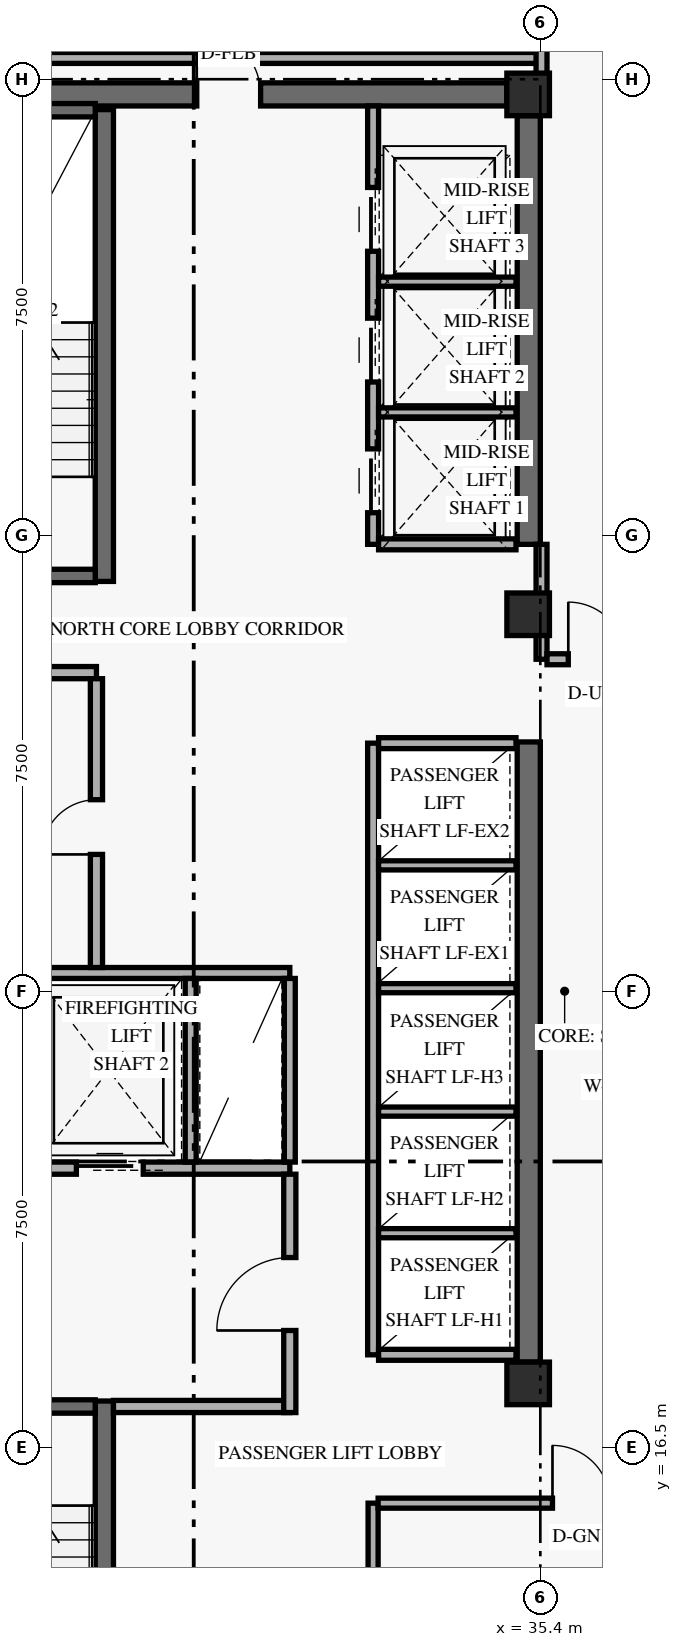
"""IFC4 building model, lengths in metres.
Left out: names, types, materials, properties, quantities, classifications, styles, units other than length and angle.
Written with IfcOpenShell. Run it as: python <this file> out.ifc"""

import sys

from ifc_helpers import new_model, si_unit, direction, frame, frame_2d, origin, origin_2d, place, context, subcontext, project, spatial, rectangle, extrude, element, fill, save


model = new_model("IFC4")
c1 = context("Model", 3, precision=1e-05, world=origin(), true_north=direction((0.0, 1.0)))
c2 = subcontext(c1, "Body", "Model", "MODEL_VIEW")
j1 = project(units=[si_unit("LENGTHUNIT", "METRE"), si_unit("PLANEANGLEUNIT", "RADIAN")], contexts=[c1])
p1 = place(None, origin())
s1 = spatial("IfcSite", under=j1, at=p1, CompositionType="ELEMENT")
p2 = place(p1, origin())
s2 = spatial("IfcBuilding", under=s1, at=p2, CompositionType="ELEMENT")
p3 = place(p2, frame((0.0, 0.0, 155.4)))
s3 = spatial("IfcBuildingStorey", under=s2, at=p3, CompositionType="ELEMENT", Elevation=155.4)
p4 = place(p3, frame((35.21, 17.9, 0.0), z_axis=(0.0, 0.0, 1.0), x_axis=(0.0, 1.0, 0.0)))
e1 = element("IfcWall", 1, at=p4, inside=s3, PredefinedType="SHEAR", context=c2, shape_type="SweptSolid", body=[
    extrude(rectangle(XDim=10.2, YDim=0.38, at=frame_2d((5.1, 0.0))), origin(), (0.0, 0.0, 1.0), 2.748),
])
p5 = place(p3, frame((35.21, 31.35, 0.0), z_axis=(0.0, 0.0, 1.0), x_axis=(0.0, 1.0, 0.0)))
e2 = element("IfcWall", 2, at=p5, inside=s3, PredefinedType="SHEAR", context=c2, shape_type="SweptSolid", body=[
    extrude(rectangle(XDim=7.05, YDim=0.38, at=frame_2d((3.525, 0.0))), origin(), (0.0, 0.0, 1.0), 2.748),
])
p6 = place(p3, frame((24.55, 38.75, 0.0), z_axis=(0.0, 0.0, 1.0), x_axis=(1.0, 0.0, 0.0)))
e3 = element("IfcWall", 3, at=p6, inside=s3, PredefinedType="SHEAR", context=c2, shape_type="SweptSolid", body=[
    extrude(rectangle(XDim=10.3, YDim=0.38, at=frame_2d((5.15, 0.0))), origin(), (0.0, 0.0, 1.0), 3.36),
])
p7 = place(p6, frame((5.2, 0.0, 0.0)))
e4 = element("IfcOpeningElement", 4, at=p7, cuts=e3, PredefinedType="OPENING", context=c2, shape_type="SweptSolid", body=[
    extrude(rectangle(XDim=1.05, YDim=2.15, at=frame_2d((0.525, 1.075))), frame((0.0, 0.2, 0.0), z_axis=(0.0, -1.0, 0.0), x_axis=(1.0, 0.0, 0.0)), (0.0, 0.0, 1.0), 0.4),
])
p8 = place(p3, frame((28.23, 9.5, 0.0), z_axis=(0.0, 0.0, 1.0), x_axis=(0.0, 1.0, 0.0)))
e5 = element("IfcWall", 5, at=p8, inside=s3, PredefinedType="SHEAR", context=c2, shape_type="SweptSolid", body=[
    extrude(rectangle(XDim=7.76, YDim=0.3, at=frame_2d((3.88, 0.0))), origin(), (0.0, 0.0, 1.0), 3.36),
])
p9 = place(p3, frame((24.92, 17.17, 0.0), z_axis=(0.0, 0.0, 1.0), x_axis=(1.0, 0.0, 0.0)))
e6 = element("IfcWall", 6, at=p9, inside=s3, PredefinedType="SHEAR", context=c2, shape_type="SweptSolid", body=[
    extrude(rectangle(XDim=3.16, YDim=0.22, at=frame_2d((1.58, 0.0))), origin(), (0.0, 0.0, 1.0), 3.36),
])
p10 = place(p9, frame((0.78, 0.0, 0.0)))
e7 = element("IfcOpeningElement", 7, at=p10, cuts=e6, PredefinedType="OPENING", context=c2, shape_type="SweptSolid", body=[
    extrude(rectangle(XDim=1.05, YDim=2.15, at=frame_2d((0.525, 1.075))), frame((0.0, 0.12, 0.0), z_axis=(0.0, -1.0, 0.0), x_axis=(1.0, 0.0, 0.0)), (0.0, 0.0, 1.0), 0.24),
])
p11 = place(p3, frame((28.23, 30.74, 0.0), z_axis=(0.0, 0.0, 1.0), x_axis=(0.0, 1.0, 0.0)))
e8 = element("IfcWall", 8, at=p11, inside=s3, PredefinedType="SHEAR", context=c2, shape_type="SweptSolid", body=[
    extrude(rectangle(XDim=7.76, YDim=0.3, at=frame_2d((3.88, 0.0))), origin(), (0.0, 0.0, 1.0), 3.36),
])
p12 = place(p3, frame((24.92, 30.83, 0.0), z_axis=(0.0, 0.0, 1.0), x_axis=(1.0, 0.0, 0.0)))
e9 = element("IfcWall", 9, at=p12, inside=s3, PredefinedType="SHEAR", context=c2, shape_type="SweptSolid", body=[
    extrude(rectangle(XDim=3.16, YDim=0.22, at=frame_2d((1.58, 0.0))), origin(), (0.0, 0.0, 1.0), 3.36),
])
p13 = place(p12, frame((0.78, 0.0, 0.0)))
e10 = element("IfcOpeningElement", 10, at=p13, cuts=e9, PredefinedType="OPENING", context=c2, shape_type="SweptSolid", body=[
    extrude(rectangle(XDim=1.05, YDim=2.15, at=frame_2d((0.525, 1.075))), frame((0.0, 0.12, 0.0), z_axis=(0.0, -1.0, 0.0), x_axis=(1.0, 0.0, 0.0)), (0.0, 0.0, 1.0), 0.24),
])
p14 = place(p3, frame((24.92, 38.49, 0.0), z_axis=(0.0, 0.0, 1.0), x_axis=(1.0, 0.0, 0.0)))
e11 = element("IfcWall", 11, at=p14, inside=s3, PredefinedType="SHEAR", context=c2, shape_type="SweptSolid", body=[
    extrude(rectangle(XDim=3.16, YDim=0.22, at=frame_2d((1.58, 0.0))), origin(), (0.0, 0.0, 1.0), 3.36),
])
for number, where, z_axis, x_axis in (
    (12, (35.2, 17.55, 0.0), (0.0, 0.0, 1.0), (1.0, 0.0, 0.0)),
    (13, (35.2, 30.2, 0.0), (0.0, 0.0, 1.0), (1.0, 0.0, 0.0)),
    (14, (35.2, 38.75, 0.0), (0.0, 0.0, 1.0), (1.0, 0.0, 0.0)),
):
    element("IfcColumn", number, at=place(p3, frame(where, z_axis=z_axis, x_axis=x_axis)), inside=s3, PredefinedType="COLUMN", context=c2, shape_type="SweptSolid", body=[
        extrude(rectangle(XDim=0.7, YDim=0.7, at=origin_2d()), origin(), (0.0, 0.0, 1.0), 3.6),
    ])
p15 = place(p3, frame((24.45, 21.09, 0.0), z_axis=(0.0, 0.0, 1.0), x_axis=(1.0, 0.0, 0.0)))
e15 = element("IfcWall", 15, at=p15, inside=s3, PredefinedType="STANDARD", context=c2, shape_type="SweptSolid", body=[
    extrude(rectangle(XDim=6.83, YDim=0.2, at=frame_2d((3.415, 0.0))), origin(), (0.0, 0.0, 1.0), 3.36),
])
p16 = place(p15, frame((0.72, 0.0, 0.0)))
e16 = element("IfcOpeningElement", 16, at=p16, cuts=e15, PredefinedType="OPENING", context=c2, shape_type="SweptSolid", body=[
    extrude(rectangle(XDim=1.1, YDim=2.2, at=frame_2d((0.55, 1.1))), frame((0.0, 0.11, 0.0), z_axis=(0.0, -1.0, 0.0), x_axis=(1.0, 0.0, 0.0)), (0.0, 0.0, 1.0), 0.22),
])
p17 = place(p15, frame((3.32, 0.0, 0.0)))
e17 = element("IfcOpeningElement", 17, at=p17, cuts=e15, PredefinedType="OPENING", context=c2, shape_type="SweptSolid", body=[
    extrude(rectangle(XDim=1.1, YDim=2.2, at=frame_2d((0.55, 1.1))), frame((0.0, 0.11, 0.0), z_axis=(0.0, -1.0, 0.0), x_axis=(1.0, 0.0, 0.0)), (0.0, 0.0, 1.0), 0.22),
])
p18 = place(p3, frame((28.38, 17.17, 0.0), z_axis=(0.0, 0.0, 1.0), x_axis=(1.0, 0.0, 0.0)))
e18 = element("IfcWall", 18, at=p18, inside=s3, PredefinedType="STANDARD", context=c2, shape_type="SweptSolid", body=[
    extrude(rectangle(XDim=2.9, YDim=0.2, at=frame_2d((1.45, 0.0))), origin(), (0.0, 0.0, 1.0), 3.36),
])
p19 = place(p3, frame((31.28, 17.07, 0.0), z_axis=(0.0, 0.0, 1.0), x_axis=(0.0, 1.0, 0.0)))
e19 = element("IfcWall", 19, at=p19, inside=s3, PredefinedType="STANDARD", context=c2, shape_type="SweptSolid", body=[
    extrude(rectangle(XDim=3.92, YDim=0.2, at=frame_2d((1.96, 0.0))), origin(), (0.0, 0.0, 1.0), 2.73),
])
p20 = place(p19, frame((1.35, 0.0, 0.0)))
e20 = element("IfcOpeningElement", 20, at=p20, cuts=e19, PredefinedType="OPENING", context=c2, shape_type="SweptSolid", body=[
    extrude(rectangle(XDim=1.2, YDim=2.15, at=frame_2d((0.6, 1.075))), frame((0.0, 0.11, 0.0), z_axis=(0.0, -1.0, 0.0), x_axis=(1.0, 0.0, 0.0)), (0.0, 0.0, 1.0), 0.22),
])
p21 = place(p3, frame((24.45, 24.3, 0.0), z_axis=(0.0, 0.0, 1.0), x_axis=(1.0, 0.0, 0.0)))
e21 = element("IfcWall", 21, at=p21, inside=s3, PredefinedType="STANDARD", context=c2, shape_type="SweptSolid", body=[
    extrude(rectangle(XDim=6.83, YDim=0.18, at=frame_2d((3.415, 0.0))), origin(), (0.0, 0.0, 1.0), 3.36),
])
for number, where, z_axis, x_axis in (
    (22, (29.65, 21.19, 0.0), (0.0, 0.0, 1.0), (0.0, 1.0, 0.0)),
    (23, (31.28, 21.19, 0.0), (0.0, 0.0, 1.0), (0.0, 1.0, 0.0)),
):
    element("IfcWall", number, at=place(p3, frame(where, z_axis=z_axis, x_axis=x_axis)), inside=s3, PredefinedType="STANDARD", context=c2, shape_type="SweptSolid", body=[
        extrude(rectangle(XDim=3.02, YDim=0.18, at=frame_2d((1.51, 0.0))), origin(), (0.0, 0.0, 1.0), 3.36),
    ])
p22 = place(p3, frame((24.45, 29.24, 0.0), z_axis=(0.0, 0.0, 1.0), x_axis=(1.0, 0.0, 0.0)))
e24 = element("IfcWall", 24, at=p22, inside=s3, PredefinedType="STANDARD", context=c2, shape_type="SweptSolid", body=[
    extrude(rectangle(XDim=3.65, YDim=0.2, at=frame_2d((1.825, 0.0))), origin(), (0.0, 0.0, 1.0), 3.36),
])
p23 = place(p3, frame((28.1, 24.39, 0.0), z_axis=(0.0, 0.0, 1.0), x_axis=(0.0, 1.0, 0.0)))
e25 = element("IfcWall", 25, at=p23, inside=s3, PredefinedType="STANDARD", context=c2, shape_type="SweptSolid", body=[
    extrude(rectangle(XDim=4.75, YDim=0.2, at=frame_2d((2.375, 0.0))), origin(), (0.0, 0.0, 1.0), 3.36),
])
p24 = place(p23, frame((1.86, 0.0, 0.0)))
e26 = element("IfcOpeningElement", 26, at=p24, cuts=e25, PredefinedType="OPENING", context=c2, shape_type="SweptSolid", body=[
    extrude(rectangle(XDim=0.9, YDim=2.1, at=frame_2d((0.45, 1.05))), frame((0.0, 0.11, 0.0), z_axis=(0.0, -1.0, 0.0), x_axis=(1.0, 0.0, 0.0)), (0.0, 0.0, 1.0), 0.22),
])
p25 = place(p3, frame((32.65, 18.02, 0.0), z_axis=(0.0, 0.0, 1.0), x_axis=(0.0, 1.0, 0.0)))
e27 = element("IfcWall", 27, at=p25, inside=s3, PredefinedType="STANDARD", context=c2, shape_type="SweptSolid", body=[
    extrude(rectangle(XDim=10.06, YDim=0.18, at=frame_2d((5.03, 0.0))), origin(), (0.0, 0.0, 1.0), 3.36),
])
for number, where, z_axis, x_axis in (
    (28, (32.74, 18.02, 0.0), (0.0, 0.0, 1.0), (1.0, 0.0, 0.0)),
    (29, (32.74, 28.08, 0.0), (0.0, 0.0, 1.0), (1.0, 0.0, 0.0)),
):
    element("IfcWall", number, at=place(p3, frame(where, z_axis=z_axis, x_axis=x_axis)), inside=s3, PredefinedType="STANDARD", context=c2, shape_type="SweptSolid", body=[
        extrude(rectangle(XDim=2.26, YDim=0.18, at=frame_2d((1.13, 0.0))), origin(), (0.0, 0.0, 1.0), 3.36),
    ])
for number, where, z_axis, x_axis in (
    (30, (32.74, 20.02, 0.0), (0.0, 0.0, 1.0), (1.0, 0.0, 0.0)),
    (31, (32.74, 22.02, 0.0), (0.0, 0.0, 1.0), (1.0, 0.0, 0.0)),
    (32, (32.74, 24.05, 0.0), (0.0, 0.0, 1.0), (1.0, 0.0, 0.0)),
    (33, (32.74, 26.07, 0.0), (0.0, 0.0, 1.0), (1.0, 0.0, 0.0)),
):
    element("IfcWall", number, at=place(p3, frame(where, z_axis=z_axis, x_axis=x_axis)), inside=s3, PredefinedType="STANDARD", context=c2, shape_type="SweptSolid", body=[
        extrude(rectangle(XDim=2.26, YDim=0.15, at=frame_2d((1.13, 0.0))), origin(), (0.0, 0.0, 1.0), 3.36),
    ])
p26 = place(p3, frame((32.65, 31.35, 0.0), z_axis=(0.0, 0.0, 1.0), x_axis=(0.0, 1.0, 0.0)))
e34 = element("IfcWall", 34, at=p26, inside=s3, PredefinedType="STANDARD", context=c2, shape_type="SweptSolid", body=[
    extrude(rectangle(XDim=7.21, YDim=0.18, at=frame_2d((3.605, 0.0))), origin(), (0.0, 0.0, 1.0), 3.36),
])
p27 = place(p26, frame((0.52, 0.0, 0.0)))
e35 = element("IfcOpeningElement", 35, at=p27, cuts=e34, PredefinedType="OPENING", context=c2, shape_type="SweptSolid", body=[
    extrude(rectangle(XDim=1.05, YDim=2.2, at=frame_2d((0.525, 1.1))), frame((0.0, 0.1, 0.0), z_axis=(0.0, -1.0, 0.0), x_axis=(1.0, 0.0, 0.0)), (0.0, 0.0, 1.0), 0.2),
])
p28 = place(p26, frame((2.67, 0.0, 0.0)))
e36 = element("IfcOpeningElement", 36, at=p28, cuts=e34, PredefinedType="OPENING", context=c2, shape_type="SweptSolid", body=[
    extrude(rectangle(XDim=1.05, YDim=2.2, at=frame_2d((0.525, 1.1))), frame((0.0, 0.1, 0.0), z_axis=(0.0, -1.0, 0.0), x_axis=(1.0, 0.0, 0.0)), (0.0, 0.0, 1.0), 0.2),
])
p29 = place(p26, frame((4.82, 0.0, 0.0)))
e37 = element("IfcOpeningElement", 37, at=p29, cuts=e34, PredefinedType="OPENING", context=c2, shape_type="SweptSolid", body=[
    extrude(rectangle(XDim=1.05, YDim=2.2, at=frame_2d((0.525, 1.1))), frame((0.0, 0.1, 0.0), z_axis=(0.0, -1.0, 0.0), x_axis=(1.0, 0.0, 0.0)), (0.0, 0.0, 1.0), 0.2),
])
p30 = place(p3, frame((32.74, 31.35, 0.0), z_axis=(0.0, 0.0, 1.0), x_axis=(1.0, 0.0, 0.0)))
e38 = element("IfcWall", 38, at=p30, inside=s3, PredefinedType="STANDARD", context=c2, shape_type="SweptSolid", body=[
    extrude(rectangle(XDim=2.26, YDim=0.18, at=frame_2d((1.13, 0.0))), origin(), (0.0, 0.0, 1.0), 3.36),
])
for number, where, z_axis, x_axis in (
    (39, (32.74, 33.52, 0.0), (0.0, 0.0, 1.0), (1.0, 0.0, 0.0)),
    (40, (32.74, 35.67, 0.0), (0.0, 0.0, 1.0), (1.0, 0.0, 0.0)),
):
    element("IfcWall", number, at=place(p3, frame(where, z_axis=z_axis, x_axis=x_axis)), inside=s3, PredefinedType="STANDARD", context=c2, shape_type="SweptSolid", body=[
        extrude(rectangle(XDim=2.26, YDim=0.15, at=frame_2d((1.13, 0.0))), origin(), (0.0, 0.0, 1.0), 3.36),
    ])
p31 = place(p3, frame((32.65, 9.5, 0.0), z_axis=(0.0, 0.0, 1.0), x_axis=(0.0, 1.0, 0.0)))
e41 = element("IfcWall", 41, at=p31, inside=s3, PredefinedType="PARTITIONING", context=c2, shape_type="SweptSolid", body=[
    extrude(rectangle(XDim=6.08, YDim=0.165, at=frame_2d((3.04, 0.0))), origin(), (0.0, 0.0, 1.0), 3.36),
])
p32 = place(p3, frame((32.732, 15.58, 0.0), z_axis=(0.0, 0.0, 1.0), x_axis=(1.0, 0.0, 0.0)))
e42 = element("IfcWall", 42, at=p32, inside=s3, PredefinedType="PARTITIONING", context=c2, shape_type="SweptSolid", body=[
    extrude(rectangle(XDim=4.818, YDim=0.165, at=frame_2d((2.409, 0.0))), origin(), (0.0, 0.0, 1.0), 2.73),
])
p33 = place(p32, frame((2.867, 0.0, 0.0)))
e43 = element("IfcOpeningElement", 43, at=p33, cuts=e42, PredefinedType="OPENING", context=c2, shape_type="SweptSolid", body=[
    extrude(rectangle(XDim=0.95, YDim=2.15, at=frame_2d((0.475, 1.075))), frame((0.0, 0.093, 0.0), z_axis=(0.0, -1.0, 0.0), x_axis=(1.0, 0.0, 0.0)), (0.0, 0.0, 1.0), 0.185),
])
p34 = place(p3, frame((35.42, 29.46, 0.0), z_axis=(0.0, 0.0, 1.0), x_axis=(0.0, 1.0, 0.0)))
e44 = element("IfcWall", 44, at=p34, inside=s3, PredefinedType="STANDARD", context=c2, shape_type="SweptSolid", body=[
    extrude(rectangle(XDim=1.89, YDim=0.18, at=frame_2d((0.945, 0.0))), origin(), (0.0, 0.0, 1.0), 2.73),
])
p35 = place(p3, frame((35.51, 29.46, 0.0), z_axis=(0.0, 0.0, 1.0), x_axis=(1.0, 0.0, 0.0)))
e45 = element("IfcWall", 45, at=p35, inside=s3, PredefinedType="STANDARD", context=c2, shape_type="SweptSolid", body=[
    extrude(rectangle(XDim=14.29, YDim=0.18, at=frame_2d((7.145, 0.0))), origin(), (0.0, 0.0, 1.0), 2.73),
])
p36 = place(p35, frame((0.35, 0.0, 0.0)))
e46 = element("IfcOpeningElement", 46, at=p36, cuts=e45, PredefinedType="OPENING", context=c2, shape_type="SweptSolid", body=[
    extrude(rectangle(XDim=0.94, YDim=2.15, at=frame_2d((0.47, 1.075))), frame((0.0, 0.1, 0.0), z_axis=(0.0, -1.0, 0.0), x_axis=(1.0, 0.0, 0.0)), (0.0, 0.0, 1.0), 0.2),
])
p37 = place(p35, frame((7.828, 0.0, 0.0)))
e47 = element("IfcOpeningElement", 47, at=p37, cuts=e45, PredefinedType="OPENING", context=c2, shape_type="SweptSolid", body=[
    extrude(rectangle(XDim=0.94, YDim=2.15, at=frame_2d((0.47, 1.075))), frame((0.0, 0.1, 0.0), z_axis=(0.0, -1.0, 0.0), x_axis=(1.0, 0.0, 0.0)), (0.0, 0.0, 1.0), 0.2),
])
p38 = place(p3, frame((23.85, 39.35, 0.0), z_axis=(0.0, 0.0, 1.0), x_axis=(1.0, 0.0, 0.0)))
e48 = element("IfcWall", 48, at=p38, inside=s3, PredefinedType="STANDARD", context=c2, shape_type="SweptSolid", body=[
    extrude(rectangle(XDim=11.57, YDim=0.18, at=frame_2d((5.785, 0.0))), origin(), (0.0, 0.0, 1.0), 2.73),
])
p39 = place(p3, frame((35.42, 38.75, 0.0), z_axis=(0.0, 0.0, 1.0), x_axis=(0.0, 1.0, 0.0)))
e49 = element("IfcWall", 49, at=p39, inside=s3, PredefinedType="PARTITIONING", context=c2, shape_type="SweptSolid", body=[
    extrude(rectangle(XDim=4.97, YDim=0.18, at=frame_2d((2.485, 0.0))), origin(), (0.0, 0.0, 1.0), 2.73),
])
p40 = place(p17, origin())
e50 = element("IfcDoor", 50, at=p40, inside=s3, OperationType="SLIDING_TO_LEFT", PredefinedType="DOOR", context=c2, shape_type="SweptSolid", body=[
    extrude(rectangle(XDim=1.1, YDim=2.2, at=frame_2d((0.55, 1.1))), frame((0.0, 0.025, 0.0), z_axis=(0.0, -1.0, 0.0), x_axis=(1.0, 0.0, 0.0)), (0.0, 0.0, 1.0), 0.05),
])
fill(e17, e50)
p41 = place(p20, origin())
e51 = element("IfcDoor", 51, at=p41, inside=s3, OperationType="SINGLE_SWING_LEFT", PredefinedType="DOOR", context=c2, shape_type="SweptSolid", body=[
    extrude(rectangle(XDim=1.2, YDim=2.15, at=frame_2d((0.6, 1.075))), frame((0.0, 0.025, 0.0), z_axis=(0.0, -1.0, 0.0), x_axis=(1.0, 0.0, 0.0)), (0.0, 0.0, 1.0), 0.05),
])
fill(e20, e51)
p42 = place(p24, origin())
e52 = element("IfcDoor", 52, at=p42, inside=s3, OperationType="SINGLE_SWING_LEFT", PredefinedType="DOOR", context=c2, shape_type="SweptSolid", body=[
    extrude(rectangle(XDim=0.9, YDim=2.1, at=frame_2d((0.45, 1.05))), frame((0.0, 0.025, 0.0), z_axis=(0.0, -1.0, 0.0), x_axis=(1.0, 0.0, 0.0)), (0.0, 0.0, 1.0), 0.05),
])
fill(e26, e52)
p43 = place(p27, origin())
e53 = element("IfcDoor", 53, at=p43, inside=s3, OperationType="SLIDING_TO_LEFT", PredefinedType="DOOR", context=c2, shape_type="SweptSolid", body=[
    extrude(rectangle(XDim=1.05, YDim=2.2, at=frame_2d((0.525, 1.1))), frame((0.0, 0.025, 0.0), z_axis=(0.0, -1.0, 0.0), x_axis=(1.0, 0.0, 0.0)), (0.0, 0.0, 1.0), 0.05),
])
fill(e35, e53)
p44 = place(p28, origin())
e54 = element("IfcDoor", 54, at=p44, inside=s3, OperationType="SLIDING_TO_LEFT", PredefinedType="DOOR", context=c2, shape_type="SweptSolid", body=[
    extrude(rectangle(XDim=1.05, YDim=2.2, at=frame_2d((0.525, 1.1))), frame((0.0, 0.025, 0.0), z_axis=(0.0, -1.0, 0.0), x_axis=(1.0, 0.0, 0.0)), (0.0, 0.0, 1.0), 0.05),
])
fill(e36, e54)
p45 = place(p29, origin())
e55 = element("IfcDoor", 55, at=p45, inside=s3, OperationType="SLIDING_TO_LEFT", PredefinedType="DOOR", context=c2, shape_type="SweptSolid", body=[
    extrude(rectangle(XDim=1.05, YDim=2.2, at=frame_2d((0.525, 1.1))), frame((0.0, 0.025, 0.0), z_axis=(0.0, -1.0, 0.0), x_axis=(1.0, 0.0, 0.0)), (0.0, 0.0, 1.0), 0.05),
])
fill(e37, e55)
p46 = place(p33, origin())
e56 = element("IfcDoor", 56, at=p46, inside=s3, OperationType="SINGLE_SWING_LEFT", PredefinedType="DOOR", context=c2, shape_type="SweptSolid", body=[
    extrude(rectangle(XDim=0.95, YDim=2.15, at=frame_2d((0.475, 1.075))), frame((0.0, 0.025, 0.0), z_axis=(0.0, -1.0, 0.0), x_axis=(1.0, 0.0, 0.0)), (0.0, 0.0, 1.0), 0.05),
])
fill(e43, e56)
p47 = place(p7, frame((1.05, 0.0, 0.0), z_axis=(0.0, 0.0, 1.0), x_axis=(-1.0, 0.0, 0.0)))
e57 = element("IfcDoor", 57, at=p47, inside=s3, OperationType="SINGLE_SWING_RIGHT", PredefinedType="DOOR", context=c2, shape_type="SweptSolid", body=[
    extrude(rectangle(XDim=1.05, YDim=2.15, at=frame_2d((0.525, 1.075))), frame((0.0, 0.025, 0.0), z_axis=(0.0, -1.0, 0.0), x_axis=(1.0, 0.0, 0.0)), (0.0, 0.0, 1.0), 0.05),
])
fill(e4, e57)
p48 = place(p36, origin())
e58 = element("IfcDoor", 58, at=p48, inside=s3, OperationType="SINGLE_SWING_LEFT", PredefinedType="DOOR", context=c2, shape_type="SweptSolid", body=[
    extrude(rectangle(XDim=0.94, YDim=2.15, at=frame_2d((0.47, 1.075))), frame((0.0, 0.025, 0.0), z_axis=(0.0, -1.0, 0.0), x_axis=(1.0, 0.0, 0.0)), (0.0, 0.0, 1.0), 0.05),
])
fill(e46, e58)
save(model, sys.argv[1])
